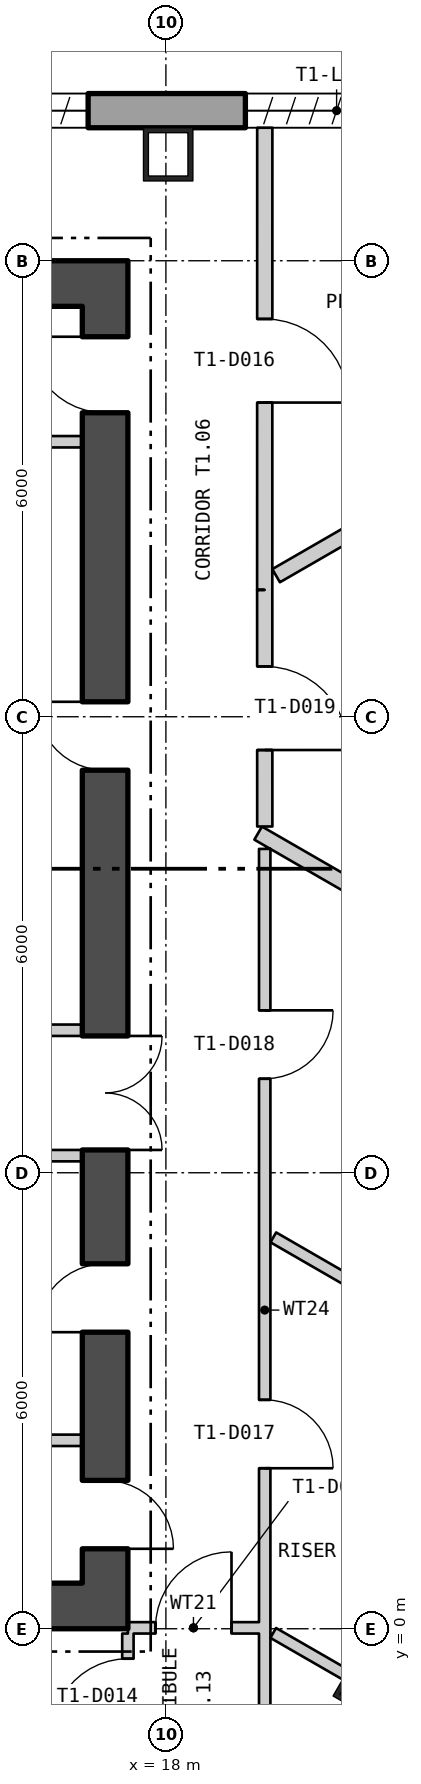
"""IFC4 building model, lengths in metres.
Left out: names, types, materials, properties, quantities, classifications, styles, units other than length and angle.
Written with IfcOpenShell. Run it as: python <this file> out.ifc"""

import sys

from ifc_helpers import new_model, si_unit, direction, frame, frame_2d, origin, origin_2d, place, context, subcontext, project, spatial, polyline, rectangle, hollow_rectangle, outline, extrude, element, fill, save


model = new_model("IFC4")
c1 = context("Model", 3, precision=1e-05, world=origin(), true_north=direction((0.0, 1.0)))
c2 = subcontext(c1, "Body", "Model", "MODEL_VIEW")
j1 = project(units=[si_unit("LENGTHUNIT", "METRE"), si_unit("PLANEANGLEUNIT", "RADIAN")], contexts=[c1])
p1 = place(None, origin())
s1 = spatial("IfcSite", under=j1, at=p1, CompositionType="ELEMENT")
p2 = place(p1, origin())
s2 = spatial("IfcBuilding", under=s1, at=p2, CompositionType="ELEMENT")
p3 = place(p2, frame((0.0, 0.0, 78.3)))
s3 = spatial("IfcBuildingStorey", under=s2, at=p3, CompositionType="ELEMENT", Elevation=78.3)
for number, where, z_axis, x_axis in (
    (1, (18.03, 19.4, 0.0), (0.0, 0.0, 1.0), (-1.0, 0.0, 0.0)),
    (2, (20.665, -0.778, 0.0), (0.0, 0.0, 1.0), (0.5, 0.866, 0.0)),
):
    element("IfcColumn", number, at=place(p3, frame(where, z_axis=z_axis, x_axis=x_axis)), inside=s3, PredefinedType="COLUMN", context=c2, shape_type="SweptSolid", body=[
        extrude(hollow_rectangle(XDim=0.65, YDim=0.7, WallThickness=0.065, at=origin_2d()), origin(), (0.0, 0.0, 1.0), 6.0),
    ])
p4 = place(p3, frame((22.87, 19.975, -0.4), z_axis=(0.0, 0.0, 1.0), x_axis=(-1.0, 0.0, 0.0)))
e3 = element("IfcWall", 3, at=p4, inside=s3, PredefinedType="SOLIDWALL", context=c2, shape_type="SweptSolid", body=[
    extrude(outline(polyline([(-0.13, -0.225), (45.87, -0.225), (45.61, 0.225), (0.13, 0.225), (-0.13, -0.225)])), origin(), (0.0, 0.0, 1.0), 6.0),
])
p5 = place(p4, frame((1.424, 0.0, 1.6)))
e4 = element("IfcOpeningElement", 4, at=p5, cuts=e3, PredefinedType="OPENING", context=c2, shape_type="SweptSolid", body=[
    extrude(rectangle(XDim=2.4, YDim=3.6, at=frame_2d((1.2, 1.8))), frame((0.0, 0.235, 0.0), z_axis=(0.0, -1.0, 0.0), x_axis=(1.0, 0.0, 0.0)), (0.0, 0.0, 1.0), 0.47),
])
p6 = place(p4, frame((5.893, 0.0, 1.6)))
e5 = element("IfcOpeningElement", 5, at=p6, cuts=e3, PredefinedType="OPENING", context=c2, shape_type="SweptSolid", body=[
    extrude(rectangle(XDim=2.4, YDim=3.6, at=frame_2d((1.2, 1.8))), frame((0.0, 0.235, 0.0), z_axis=(0.0, -1.0, 0.0), x_axis=(1.0, 0.0, 0.0)), (0.0, 0.0, 1.0), 0.47),
])
p7 = place(p4, frame((10.401, 0.0, 1.6)))
e6 = element("IfcOpeningElement", 6, at=p7, cuts=e3, PredefinedType="OPENING", context=c2, shape_type="SweptSolid", body=[
    extrude(rectangle(XDim=2.4, YDim=3.6, at=frame_2d((1.2, 1.8))), frame((0.0, 0.235, 0.0), z_axis=(0.0, -1.0, 0.0), x_axis=(1.0, 0.0, 0.0)), (0.0, 0.0, 1.0), 0.47),
])
p8 = place(p4, frame((14.909, 0.0, 1.6)))
e7 = element("IfcOpeningElement", 7, at=p8, cuts=e3, PredefinedType="OPENING", context=c2, shape_type="SweptSolid", body=[
    extrude(rectangle(XDim=2.4, YDim=3.6, at=frame_2d((1.2, 1.8))), frame((0.0, 0.235, 0.0), z_axis=(0.0, -1.0, 0.0), x_axis=(1.0, 0.0, 0.0)), (0.0, 0.0, 1.0), 0.47),
])
p9 = place(p4, frame((19.416, 0.0, 1.6)))
e8 = element("IfcOpeningElement", 8, at=p9, cuts=e3, PredefinedType="OPENING", context=c2, shape_type="SweptSolid", body=[
    extrude(rectangle(XDim=2.4, YDim=3.6, at=frame_2d((1.2, 1.8))), frame((0.0, 0.235, 0.0), z_axis=(0.0, -1.0, 0.0), x_axis=(1.0, 0.0, 0.0)), (0.0, 0.0, 1.0), 0.47),
])
p10 = place(p4, frame((23.924, 0.0, 1.6)))
e9 = element("IfcOpeningElement", 9, at=p10, cuts=e3, PredefinedType="OPENING", context=c2, shape_type="SweptSolid", body=[
    extrude(rectangle(XDim=2.4, YDim=3.6, at=frame_2d((1.2, 1.8))), frame((0.0, 0.235, 0.0), z_axis=(0.0, -1.0, 0.0), x_axis=(1.0, 0.0, 0.0)), (0.0, 0.0, 1.0), 0.47),
])
p11 = place(p4, frame((28.431, 0.0, 1.6)))
e10 = element("IfcOpeningElement", 10, at=p11, cuts=e3, PredefinedType="OPENING", context=c2, shape_type="SweptSolid", body=[
    extrude(rectangle(XDim=2.4, YDim=3.6, at=frame_2d((1.2, 1.8))), frame((0.0, 0.235, 0.0), z_axis=(0.0, -1.0, 0.0), x_axis=(1.0, 0.0, 0.0)), (0.0, 0.0, 1.0), 0.47),
])
p12 = place(p4, frame((32.939, 0.0, 1.6)))
e11 = element("IfcOpeningElement", 11, at=p12, cuts=e3, PredefinedType="OPENING", context=c2, shape_type="SweptSolid", body=[
    extrude(rectangle(XDim=2.4, YDim=3.6, at=frame_2d((1.2, 1.8))), frame((0.0, 0.235, 0.0), z_axis=(0.0, -1.0, 0.0), x_axis=(1.0, 0.0, 0.0)), (0.0, 0.0, 1.0), 0.47),
])
p13 = place(p4, frame((37.447, 0.0, 1.6)))
e12 = element("IfcOpeningElement", 12, at=p13, cuts=e3, PredefinedType="OPENING", context=c2, shape_type="SweptSolid", body=[
    extrude(rectangle(XDim=2.4, YDim=3.6, at=frame_2d((1.2, 1.8))), frame((0.0, 0.235, 0.0), z_axis=(0.0, -1.0, 0.0), x_axis=(1.0, 0.0, 0.0)), (0.0, 0.0, 1.0), 0.47),
])
p14 = place(p4, frame((41.916, 0.0, 1.6)))
e13 = element("IfcOpeningElement", 13, at=p14, cuts=e3, PredefinedType="OPENING", context=c2, shape_type="SweptSolid", body=[
    extrude(rectangle(XDim=2.4, YDim=3.6, at=frame_2d((1.2, 1.8))), frame((0.0, 0.235, 0.0), z_axis=(0.0, -1.0, 0.0), x_axis=(1.0, 0.0, 0.0)), (0.0, 0.0, 1.0), 0.47),
])
p15 = place(p3, frame((5.22, -28.679, -0.18), z_axis=(0.0, 0.0, 1.0), x_axis=(0.500000711659, 0.866024992908, 0.0)))
e14 = element("IfcWall", 14, at=p15, inside=s3, PredefinedType="SOLIDWALL", context=c2, shape_type="SweptSolid", body=[
    extrude(outline(polyline([(-0.13, -0.225), (45.87, -0.225), (45.61, 0.225), (0.13, 0.225), (-0.13, -0.225)])), origin(), (0.0, 0.0, 1.0), 6.0),
])
p16 = place(p15, frame((1.424, 0.0, 1.38)))
e15 = element("IfcOpeningElement", 15, at=p16, cuts=e14, PredefinedType="OPENING", context=c2, shape_type="SweptSolid", body=[
    extrude(rectangle(XDim=2.4, YDim=3.6, at=frame_2d((1.2, 1.8))), frame((0.0, 0.235, 0.0), z_axis=(0.0, -1.0, 0.0), x_axis=(1.0, 0.0, 0.0)), (0.0, 0.0, 1.0), 0.47),
])
p17 = place(p15, frame((5.893, 0.0, 1.38)))
e16 = element("IfcOpeningElement", 16, at=p17, cuts=e14, PredefinedType="OPENING", context=c2, shape_type="SweptSolid", body=[
    extrude(rectangle(XDim=2.4, YDim=3.6, at=frame_2d((1.2, 1.8))), frame((0.0, 0.235, 0.0), z_axis=(0.0, -1.0, 0.0), x_axis=(1.0, 0.0, 0.0)), (0.0, 0.0, 1.0), 0.47),
])
p18 = place(p15, frame((10.401, 0.0, 1.38)))
e17 = element("IfcOpeningElement", 17, at=p18, cuts=e14, PredefinedType="OPENING", context=c2, shape_type="SweptSolid", body=[
    extrude(rectangle(XDim=2.4, YDim=3.6, at=frame_2d((1.2, 1.8))), frame((0.0, 0.235, 0.0), z_axis=(0.0, -1.0, 0.0), x_axis=(1.0, 0.0, 0.0)), (0.0, 0.0, 1.0), 0.47),
])
p19 = place(p15, frame((14.909, 0.0, 1.38)))
e18 = element("IfcOpeningElement", 18, at=p19, cuts=e14, PredefinedType="OPENING", context=c2, shape_type="SweptSolid", body=[
    extrude(rectangle(XDim=2.4, YDim=3.6, at=frame_2d((1.2, 1.8))), frame((0.0, 0.235, 0.0), z_axis=(0.0, -1.0, 0.0), x_axis=(1.0, 0.0, 0.0)), (0.0, 0.0, 1.0), 0.47),
])
p20 = place(p15, frame((19.416, 0.0, 1.38)))
e19 = element("IfcOpeningElement", 19, at=p20, cuts=e14, PredefinedType="OPENING", context=c2, shape_type="SweptSolid", body=[
    extrude(rectangle(XDim=2.4, YDim=3.6, at=frame_2d((1.2, 1.8))), frame((0.0, 0.235, 0.0), z_axis=(0.0, -1.0, 0.0), x_axis=(1.0, 0.0, 0.0)), (0.0, 0.0, 1.0), 0.47),
])
p21 = place(p15, frame((23.924, 0.0, 1.38)))
e20 = element("IfcOpeningElement", 20, at=p21, cuts=e14, PredefinedType="OPENING", context=c2, shape_type="SweptSolid", body=[
    extrude(rectangle(XDim=2.4, YDim=3.6, at=frame_2d((1.2, 1.8))), frame((0.0, 0.235, 0.0), z_axis=(0.0, -1.0, 0.0), x_axis=(1.0, 0.0, 0.0)), (0.0, 0.0, 1.0), 0.47),
])
p22 = place(p15, frame((28.431, 0.0, 1.38)))
e21 = element("IfcOpeningElement", 21, at=p22, cuts=e14, PredefinedType="OPENING", context=c2, shape_type="SweptSolid", body=[
    extrude(rectangle(XDim=2.4, YDim=3.6, at=frame_2d((1.2, 1.8))), frame((0.0, 0.235, 0.0), z_axis=(0.0, -1.0, 0.0), x_axis=(1.0, 0.0, 0.0)), (0.0, 0.0, 1.0), 0.47),
])
p23 = place(p15, frame((32.939, 0.0, 1.38)))
e22 = element("IfcOpeningElement", 22, at=p23, cuts=e14, PredefinedType="OPENING", context=c2, shape_type="SweptSolid", body=[
    extrude(rectangle(XDim=2.4, YDim=3.6, at=frame_2d((1.2, 1.8))), frame((0.0, 0.235, 0.0), z_axis=(0.0, -1.0, 0.0), x_axis=(1.0, 0.0, 0.0)), (0.0, 0.0, 1.0), 0.47),
])
p24 = place(p15, frame((37.447, 0.0, 1.38)))
e23 = element("IfcOpeningElement", 23, at=p24, cuts=e14, PredefinedType="OPENING", context=c2, shape_type="SweptSolid", body=[
    extrude(rectangle(XDim=2.4, YDim=3.6, at=frame_2d((1.2, 1.8))), frame((0.0, 0.235, 0.0), z_axis=(0.0, -1.0, 0.0), x_axis=(1.0, 0.0, 0.0)), (0.0, 0.0, 1.0), 0.47),
])
p25 = place(p15, frame((41.916, 0.0, 1.38)))
e24 = element("IfcOpeningElement", 24, at=p25, cuts=e14, PredefinedType="OPENING", context=c2, shape_type="SweptSolid", body=[
    extrude(rectangle(XDim=2.4, YDim=3.6, at=frame_2d((1.2, 1.8))), frame((0.0, 0.235, 0.0), z_axis=(0.0, -1.0, 0.0), x_axis=(1.0, 0.0, 0.0)), (0.0, 0.0, 1.0), 0.47),
])
p26 = place(p3, frame((-17.5, 0.3, 0.0), z_axis=(0.0, 0.0, 1.0), x_axis=(1.0, 0.0, 0.0)))
e25 = element("IfcWall", 25, at=p26, inside=s3, PredefinedType="SHEAR", context=c2, shape_type="SweptSolid", body=[
    extrude(rectangle(XDim=35.0, YDim=0.6, at=frame_2d((17.5, 0.0))), origin(), (0.0, 0.0, 1.0), 5.8),
])
p27 = place(p26, frame((12.0, 0.0, 0.0)))
e26 = element("IfcOpeningElement", 26, at=p27, cuts=e25, PredefinedType="OPENING", context=c2, shape_type="SweptSolid", body=[
    extrude(rectangle(XDim=1.8, YDim=2.4, at=frame_2d((0.9, 1.2))), frame((0.0, 0.31, 0.0), z_axis=(0.0, -1.0, 0.0), x_axis=(1.0, 0.0, 0.0)), (0.0, 0.0, 1.0), 0.62),
])
p28 = place(p26, frame((22.0, 0.0, 0.0)))
e27 = element("IfcOpeningElement", 27, at=p28, cuts=e25, PredefinedType="OPENING", context=c2, shape_type="SweptSolid", body=[
    extrude(rectangle(XDim=1.8, YDim=2.4, at=frame_2d((0.9, 1.2))), frame((0.0, 0.31, 0.0), z_axis=(0.0, -1.0, 0.0), x_axis=(1.0, 0.0, 0.0)), (0.0, 0.0, 1.0), 0.62),
])
p29 = place(p3, frame((-17.5, 17.7, 0.0), z_axis=(0.0, 0.0, 1.0), x_axis=(1.0, 0.0, 0.0)))
e28 = element("IfcWall", 28, at=p29, inside=s3, PredefinedType="SHEAR", context=c2, shape_type="SweptSolid", body=[
    extrude(rectangle(XDim=35.0, YDim=0.6, at=frame_2d((17.5, 0.0))), origin(), (0.0, 0.0, 1.0), 5.8),
])
p30 = place(p3, frame((17.2, 0.6, 0.0), z_axis=(0.0, 0.0, 1.0), x_axis=(0.0, 1.0, 0.0)))
e29 = element("IfcWall", 29, at=p30, inside=s3, PredefinedType="SHEAR", context=c2, shape_type="SweptSolid", body=[
    extrude(rectangle(XDim=16.8, YDim=0.6, at=frame_2d((8.4, 0.0))), origin(), (0.0, 0.0, 1.0), 5.8),
])
p31 = place(p30, frame((5.7, 0.0, 0.0)))
e30 = element("IfcOpeningElement", 30, at=p31, cuts=e29, PredefinedType="OPENING", context=c2, shape_type="SweptSolid", body=[
    extrude(rectangle(XDim=1.5, YDim=2.1, at=frame_2d((0.75, 1.05))), frame((0.0, 0.31, 0.0), z_axis=(0.0, -1.0, 0.0), x_axis=(1.0, 0.0, 0.0)), (0.0, 0.0, 1.0), 0.62),
])
p32 = place(p30, frame((0.452, 0.0, 0.0)))
e31 = element("IfcOpeningElement", 31, at=p32, cuts=e29, PredefinedType="OPENING", context=c2, shape_type="SweptSolid", body=[
    extrude(rectangle(XDim=0.9, YDim=2.1, at=frame_2d((0.45, 1.05))), frame((0.0, 0.31, 0.0), z_axis=(0.0, -1.0, 0.0), x_axis=(1.0, 0.0, 0.0)), (0.0, 0.0, 1.0), 0.62),
])
p33 = place(p30, frame((3.302, 0.0, 0.0)))
e32 = element("IfcOpeningElement", 32, at=p33, cuts=e29, PredefinedType="OPENING", context=c2, shape_type="SweptSolid", body=[
    extrude(rectangle(XDim=0.9, YDim=2.1, at=frame_2d((0.45, 1.05))), frame((0.0, 0.31, 0.0), z_axis=(0.0, -1.0, 0.0), x_axis=(1.0, 0.0, 0.0)), (0.0, 0.0, 1.0), 0.62),
])
p34 = place(p30, frame((10.697, 0.0, 0.0)))
e33 = element("IfcOpeningElement", 33, at=p34, cuts=e29, PredefinedType="OPENING", context=c2, shape_type="SweptSolid", body=[
    extrude(rectangle(XDim=0.9, YDim=2.1, at=frame_2d((0.45, 1.05))), frame((0.0, 0.31, 0.0), z_axis=(0.0, -1.0, 0.0), x_axis=(1.0, 0.0, 0.0)), (0.0, 0.0, 1.0), 0.62),
])
p35 = place(p30, frame((15.4, 0.0, 0.0)))
e34 = element("IfcOpeningElement", 34, at=p35, cuts=e29, PredefinedType="OPENING", context=c2, shape_type="SweptSolid", body=[
    extrude(rectangle(XDim=1.0, YDim=2.1, at=frame_2d((0.5, 1.05))), frame((0.0, 0.31, 0.0), z_axis=(0.0, -1.0, 0.0), x_axis=(1.0, 0.0, 0.0)), (0.0, 0.0, 1.0), 0.62),
])
for number, where, z_axis, x_axis in (
    (35, (14.5, 6.225, 0.0), (0.0, 0.0, 1.0), (1.0, 0.0, 0.0)),
    (36, (14.5, 7.875, 0.0), (0.0, 0.0, 1.0), (1.0, 0.0, 0.0)),
    (37, (14.5, 2.479, 0.0), (0.0, 0.0, 1.0), (1.0, 0.0, 0.0)),
    (38, (14.5, 15.618, 0.0), (0.0, 0.0, 1.0), (1.0, 0.0, 0.0)),
):
    element("IfcWall", number, at=place(p3, frame(where, z_axis=z_axis, x_axis=x_axis)), inside=s3, PredefinedType="PARTITIONING", context=c2, shape_type="SweptSolid", body=[
        extrude(rectangle(XDim=2.4, YDim=0.15, at=frame_2d((1.2, 0.0))), origin(), (0.0, 0.0, 1.0), 5.8),
    ])
p36 = place(p3, frame((17.5, -1.725, 0.0), z_axis=(0.0, 0.0, 1.0), x_axis=(0.0, 1.0, 0.0)))
e39 = element("IfcWall", 39, at=p36, inside=s3, PredefinedType="PARTITIONING", context=c2, shape_type="SweptSolid", body=[
    extrude(rectangle(XDim=1.662, YDim=0.15, at=frame_2d((0.831, 0.0))), origin(), (0.0, 0.0, 1.0), 5.8),
])
p37 = place(p36, frame((0.331, 0.0, 0.0)))
e40 = element("IfcOpeningElement", 40, at=p37, cuts=e39, PredefinedType="OPENING", context=c2, shape_type="SweptSolid", body=[
    extrude(rectangle(XDim=1.0, YDim=2.1, at=frame_2d((0.5, 1.05))), frame((0.0, 0.085, 0.0), z_axis=(0.0, -1.0, 0.0), x_axis=(1.0, 0.0, 0.0)), (0.0, 0.0, 1.0), 0.17),
])
p38 = place(p3, frame((17.5, 0.012, 0.0), z_axis=(0.0, 0.0, 1.0), x_axis=(1.0, 0.0, 0.0)))
e41 = element("IfcWall", 41, at=p38, inside=s3, PredefinedType="PARTITIONING", context=c2, shape_type="SweptSolid", body=[
    extrude(rectangle(XDim=1.725, YDim=0.15, at=frame_2d((0.863, 0.0))), origin(), (0.0, 0.0, 1.0), 5.2),
])
p39 = place(p38, frame((0.363, 0.0, 0.0)))
e42 = element("IfcOpeningElement", 42, at=p39, cuts=e41, PredefinedType="OPENING", context=c2, shape_type="SweptSolid", body=[
    extrude(rectangle(XDim=1.0, YDim=2.1, at=frame_2d((0.5, 1.05))), frame((0.0, 0.085, 0.0), z_axis=(0.0, -1.0, 0.0), x_axis=(1.0, 0.0, 0.0)), (0.0, 0.0, 1.0), 0.17),
])
p40 = place(p3, frame((19.214, 10.469, 0.0), z_axis=(0.0, 0.0, 1.0), x_axis=(0.866102085121, -0.499867160503, 0.0)))
e43 = element("IfcWall", 43, at=p40, inside=s3, PredefinedType="PARTITIONING", context=c2, shape_type="SweptSolid", body=[
    extrude(rectangle(XDim=6.78, YDim=0.2, at=frame_2d((3.39, 0.0))), origin(), (0.0, 0.0, 1.0), 5.8),
])
p41 = place(p3, frame((19.3, 13.669, 0.0), z_axis=(0.0, 0.0, 1.0), x_axis=(0.000164446635, 0.999999986479, 0.0)))
e44 = element("IfcWall", 44, at=p41, inside=s3, PredefinedType="PARTITIONING", context=c2, shape_type="SweptSolid", body=[
    extrude(rectangle(XDim=6.081, YDim=0.2, at=frame_2d((3.041, 0.0))), origin(), (0.0, 0.0, 1.0), 5.8),
])
p42 = place(p41, frame((2.465, 0.0, 0.0)))
e45 = element("IfcOpeningElement", 45, at=p42, cuts=e44, PredefinedType="OPENING", context=c2, shape_type="SweptSolid", body=[
    extrude(rectangle(XDim=1.1, YDim=2.1, at=frame_2d((0.55, 1.05))), frame((0.0, 0.11, 0.0), z_axis=(0.0, -1.0, 0.0), x_axis=(1.0, 0.0, 0.0)), (0.0, 0.0, 1.0), 0.22),
])
p43 = place(p3, frame((19.3, -1.875, 0.0), z_axis=(0.0, 0.0, 1.0), x_axis=(0.0, 1.0, 0.0)))
e46 = element("IfcWall", 46, at=p43, inside=s3, PredefinedType="PARTITIONING", context=c2, shape_type="SweptSolid", body=[
    extrude(rectangle(XDim=12.136, YDim=0.15, at=frame_2d((6.068, 0.0))), origin(), (0.0, 0.0, 1.0), 5.8),
])
p44 = place(p43, frame((3.987, 0.0, 0.0)))
e47 = element("IfcOpeningElement", 47, at=p44, cuts=e46, PredefinedType="OPENING", context=c2, shape_type="SweptSolid", body=[
    extrude(rectangle(XDim=0.9, YDim=2.1, at=frame_2d((0.45, 1.05))), frame((0.0, 0.085, 0.0), z_axis=(0.0, -1.0, 0.0), x_axis=(1.0, 0.0, 0.0)), (0.0, 0.0, 1.0), 0.17),
])
p45 = place(p43, frame((9.112, 0.0, 0.0)))
e48 = element("IfcOpeningElement", 48, at=p45, cuts=e46, PredefinedType="OPENING", context=c2, shape_type="SweptSolid", body=[
    extrude(rectangle(XDim=0.9, YDim=2.1, at=frame_2d((0.45, 1.05))), frame((0.0, 0.085, 0.0), z_axis=(0.0, -1.0, 0.0), x_axis=(1.0, 0.0, 0.0)), (0.0, 0.0, 1.0), 0.17),
])
p46 = place(p3, frame((19.3, 13.669, 0.0), z_axis=(0.0, 0.0, 1.0), x_axis=(0.00032123352, -0.999999948405, 0.0)))
e49 = element("IfcWall", 49, at=p46, inside=s3, PredefinedType="PARTITIONING", context=c2, shape_type="SweptSolid", body=[
    extrude(rectangle(XDim=3.113, YDim=0.2, at=frame_2d((1.556, 0.0))), origin(), (0.0, 0.0, 1.0), 5.8),
])
p47 = place(p46, frame((1.007, 0.0, 0.0)))
e50 = element("IfcOpeningElement", 50, at=p47, cuts=e49, PredefinedType="OPENING", context=c2, shape_type="SweptSolid", body=[
    extrude(rectangle(XDim=1.1, YDim=2.1, at=frame_2d((0.55, 1.05))), frame((0.0, 0.11, 0.0), z_axis=(0.0, -1.0, 0.0), x_axis=(1.0, 0.0, 0.0)), (0.0, 0.0, 1.0), 0.22),
])
p48 = place(p3, frame((19.412, -0.055, 0.0), z_axis=(0.0, 0.0, 1.0), x_axis=(0.866408170701, -0.499336441433, 0.0)))
e51 = element("IfcWall", 51, at=p48, inside=s3, PredefinedType="PARTITIONING", context=c2, shape_type="SweptSolid", body=[
    extrude(rectangle(XDim=1.346, YDim=0.15, at=frame_2d((0.673, 0.0))), origin(), (0.0, 0.0, 1.0), 5.8),
])
p49 = place(p3, frame((19.413, 5.15, 0.0), z_axis=(0.0, 0.0, 1.0), x_axis=(0.866021079084, -0.500007490527, 0.0)))
e52 = element("IfcWall", 52, at=p49, inside=s3, PredefinedType="PARTITIONING", context=c2, shape_type="SweptSolid", body=[
    extrude(rectangle(XDim=3.948, YDim=0.15, at=frame_2d((1.974, 0.0))), origin(), (0.0, 0.0, 1.0), 5.8),
])
p50 = place(p3, frame((19.45, 13.856, 0.0), z_axis=(0.0, 0.0, 1.0), x_axis=(0.866163788575, 0.499760233874, 0.0)))
e53 = element("IfcWall", 53, at=p50, inside=s3, PredefinedType="PARTITIONING", context=c2, shape_type="SweptSolid", body=[
    extrude(rectangle(XDim=5.347, YDim=0.2, at=frame_2d((2.673, 0.0))), origin(), (0.0, 0.0, 1.0), 5.8),
])
p51 = place(p31, origin())
e54 = element("IfcDoor", 54, at=p51, inside=s3, OperationType="DOUBLE_DOOR_SINGLE_SWING", PredefinedType="DOOR", context=c2, shape_type="SweptSolid", body=[
    extrude(rectangle(XDim=1.5, YDim=2.1, at=frame_2d((0.75, 1.05))), frame((0.0, 0.025, 0.0), z_axis=(0.0, -1.0, 0.0), x_axis=(1.0, 0.0, 0.0)), (0.0, 0.0, 1.0), 0.05),
])
fill(e30, e54)
p52 = place(p32, origin())
e55 = element("IfcDoor", 55, at=p52, inside=s3, OperationType="SINGLE_SWING_LEFT", PredefinedType="DOOR", context=c2, shape_type="SweptSolid", body=[
    extrude(rectangle(XDim=0.9, YDim=2.1, at=frame_2d((0.45, 1.05))), frame((0.0, 0.025, 0.0), z_axis=(0.0, -1.0, 0.0), x_axis=(1.0, 0.0, 0.0)), (0.0, 0.0, 1.0), 0.05),
])
fill(e31, e55)
p53 = place(p33, origin())
e56 = element("IfcDoor", 56, at=p53, inside=s3, OperationType="SINGLE_SWING_RIGHT", PredefinedType="DOOR", context=c2, shape_type="SweptSolid", body=[
    extrude(rectangle(XDim=0.9, YDim=2.1, at=frame_2d((0.45, 1.05))), frame((0.0, 0.025, 0.0), z_axis=(0.0, -1.0, 0.0), x_axis=(1.0, 0.0, 0.0)), (0.0, 0.0, 1.0), 0.05),
])
fill(e32, e56)
p54 = place(p34, origin())
e57 = element("IfcDoor", 57, at=p54, inside=s3, OperationType="SINGLE_SWING_LEFT", PredefinedType="DOOR", context=c2, shape_type="SweptSolid", body=[
    extrude(rectangle(XDim=0.9, YDim=2.1, at=frame_2d((0.45, 1.05))), frame((0.0, 0.025, 0.0), z_axis=(0.0, -1.0, 0.0), x_axis=(1.0, 0.0, 0.0)), (0.0, 0.0, 1.0), 0.05),
])
fill(e33, e57)
p55 = place(p35, origin())
e58 = element("IfcDoor", 58, at=p55, inside=s3, OperationType="SINGLE_SWING_LEFT", PredefinedType="DOOR", context=c2, shape_type="SweptSolid", body=[
    extrude(rectangle(XDim=1.0, YDim=2.1, at=frame_2d((0.5, 1.05))), frame((0.0, 0.025, 0.0), z_axis=(0.0, -1.0, 0.0), x_axis=(1.0, 0.0, 0.0)), (0.0, 0.0, 1.0), 0.05),
])
fill(e34, e58)
p56 = place(p37, origin())
e59 = element("IfcDoor", 59, at=p56, inside=s3, OperationType="SINGLE_SWING_RIGHT", PredefinedType="DOOR", context=c2, shape_type="SweptSolid", body=[
    extrude(rectangle(XDim=1.0, YDim=2.1, at=frame_2d((0.5, 1.05))), frame((0.0, 0.025, 0.0), z_axis=(0.0, -1.0, 0.0), x_axis=(1.0, 0.0, 0.0)), (0.0, 0.0, 1.0), 0.05),
])
fill(e40, e59)
p57 = place(p39, origin())
e60 = element("IfcDoor", 60, at=p57, inside=s3, OperationType="SINGLE_SWING_LEFT", PredefinedType="DOOR", context=c2, shape_type="SweptSolid", body=[
    extrude(rectangle(XDim=1.0, YDim=2.1, at=frame_2d((0.5, 1.05))), frame((0.0, 0.025, 0.0), z_axis=(0.0, -1.0, 0.0), x_axis=(1.0, 0.0, 0.0)), (0.0, 0.0, 1.0), 0.05),
])
fill(e42, e60)
p58 = place(p42, origin())
e61 = element("IfcDoor", 61, at=p58, inside=s3, OperationType="SINGLE_SWING_LEFT", PredefinedType="DOOR", context=c2, shape_type="SweptSolid", body=[
    extrude(rectangle(XDim=1.1, YDim=2.1, at=frame_2d((0.55, 1.05))), frame((0.0, 0.025, 0.0), z_axis=(0.0, -1.0, 0.0), x_axis=(1.0, 0.0, 0.0)), (0.0, 0.0, 1.0), 0.05),
])
fill(e45, e61)
p59 = place(p44, origin())
e62 = element("IfcDoor", 62, at=p59, inside=s3, OperationType="SINGLE_SWING_LEFT", PredefinedType="DOOR", context=c2, shape_type="SweptSolid", body=[
    extrude(rectangle(XDim=0.9, YDim=2.1, at=frame_2d((0.45, 1.05))), frame((0.0, 0.025, 0.0), z_axis=(0.0, -1.0, 0.0), x_axis=(1.0, 0.0, 0.0)), (0.0, 0.0, 1.0), 0.05),
])
fill(e47, e62)
p60 = place(p45, origin())
e63 = element("IfcDoor", 63, at=p60, inside=s3, OperationType="SINGLE_SWING_RIGHT", PredefinedType="DOOR", context=c2, shape_type="SweptSolid", body=[
    extrude(rectangle(XDim=0.9, YDim=2.1, at=frame_2d((0.45, 1.05))), frame((0.0, 0.025, 0.0), z_axis=(0.0, -1.0, 0.0), x_axis=(1.0, 0.0, 0.0)), (0.0, 0.0, 1.0), 0.05),
])
fill(e48, e63)
p61 = place(p47, origin())
e64 = element("IfcDoor", 64, at=p61, inside=s3, OperationType="SINGLE_SWING_LEFT", PredefinedType="DOOR", context=c2, shape_type="SweptSolid", body=[
    extrude(rectangle(XDim=1.1, YDim=2.1, at=frame_2d((0.55, 1.05))), frame((0.0, 0.025, 0.0), z_axis=(0.0, -1.0, 0.0), x_axis=(1.0, 0.0, 0.0)), (0.0, 0.0, 1.0), 0.05),
])
fill(e50, e64)
save(model, sys.argv[1])
